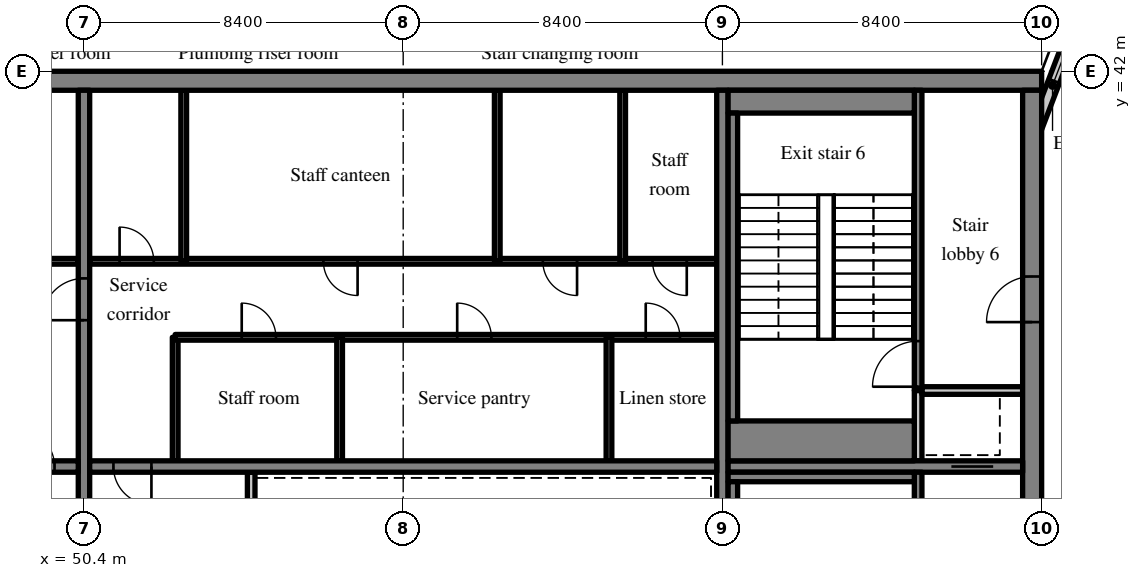
"""IFC4 building model, lengths in metres.
Left out: names, types, materials, properties, quantities, classifications, styles, units other than length and angle.
Written with IfcOpenShell. Run it as: python <this file> out.ifc"""

import sys

from ifc_helpers import new_model, si_unit, direction, frame, frame_2d, origin, place, context, subcontext, project, spatial, rectangle, extrude, source, transform, mapped, element, fill, save


model = new_model("IFC4")
c1 = context("Model", 3, precision=1e-05, world=origin(), true_north=direction((0.0, 1.0)))
c2 = subcontext(c1, "Body", "Model", "MODEL_VIEW")
j1 = project(units=[si_unit("LENGTHUNIT", "METRE"), si_unit("PLANEANGLEUNIT", "RADIAN")], contexts=[c1])
p1 = place(None, origin())
s1 = spatial("IfcSite", under=j1, at=p1, CompositionType="ELEMENT")
p2 = place(p1, origin())
s2 = spatial("IfcBuilding", under=s1, at=p2, CompositionType="ELEMENT")
p3 = place(p2, frame((0.0, 0.0, 297.7)))
s3 = spatial("IfcBuildingStorey", under=s2, at=p3, CompositionType="ELEMENT", Elevation=297.7)
m1 = source(origin(), c2, "Body", "SweptSolid", [
    extrude(rectangle(XDim=50.4, YDim=0.5, at=frame_2d((25.2, 0.0))), origin(), (0.0, 0.0, 1.0), 3.72),
])
p4 = place(p3, frame((25.2, 41.75, 0.0), z_axis=(0.0, 0.0, 1.0), x_axis=(1.0, 0.0, 0.0)))
e1 = element("IfcWall", 1, at=p4, inside=s3, PredefinedType="SHEAR", context=c2, shape_type="MappedRepresentation", body=[
    mapped(m1, transform((0.0, 0.0, 0.0), scale=1.0)),
])
m2 = source(origin(), c2, "Body", "SweptSolid", [
    extrude(rectangle(XDim=19.0, YDim=0.5, at=frame_2d((9.5, 0.0))), origin(), (0.0, 0.0, 1.0), 3.72),
])
p5 = place(p3, frame((75.35, 22.5, 0.0), z_axis=(0.0, 0.0, 1.0), x_axis=(0.0, 1.0, 0.0)))
e2 = element("IfcWall", 2, at=p5, inside=s3, PredefinedType="SHEAR", context=c2, shape_type="MappedRepresentation", body=[
    mapped(m2, transform((0.0, 0.0, 0.0), scale=1.0)),
])
m3 = source(origin(), c2, "Body", "SweptSolid", [
    extrude(rectangle(XDim=1.2, YDim=2.1, at=frame_2d((0.6, 1.05))), frame((0.0, 0.26, 0.0), z_axis=(0.0, -1.0, 0.0), x_axis=(1.0, 0.0, 0.0)), (0.0, 0.0, 1.0), 0.52),
])
p6 = place(p5, frame((12.9, 0.0, 0.0)))
e3 = element("IfcOpeningElement", 3, at=p6, cuts=e2, PredefinedType="OPENING", context=c2, shape_type="MappedRepresentation", body=[
    mapped(m3, transform((0.0, 0.0, 0.0), scale=1.0)),
])
m4 = source(origin(), c2, "Body", "SweptSolid", [
    extrude(rectangle(XDim=19.0, YDim=0.3, at=frame_2d((9.5, 0.0))), origin(), (0.0, 0.0, 1.0), 3.72),
])
p7 = place(p3, frame((50.4, 22.5, 0.0), z_axis=(0.0, 0.0, 1.0), x_axis=(0.0, 1.0, 0.0)))
e4 = element("IfcWall", 4, at=p7, inside=s3, PredefinedType="SHEAR", context=c2, shape_type="MappedRepresentation", body=[
    mapped(m4, transform((0.0, 0.0, 0.0), scale=1.0)),
])
m5 = source(origin(), c2, "Body", "SweptSolid", [
    extrude(rectangle(XDim=1.1, YDim=2.1, at=frame_2d((0.55, 1.05))), frame((0.0, 0.16, 0.0), z_axis=(0.0, -1.0, 0.0), x_axis=(1.0, 0.0, 0.0)), (0.0, 0.0, 1.0), 0.32),
])
p8 = place(p7, frame((12.95, 0.0, 0.0)))
e5 = element("IfcOpeningElement", 5, at=p8, cuts=e4, PredefinedType="OPENING", context=c2, shape_type="MappedRepresentation", body=[
    mapped(m5, transform((0.0, 0.0, 0.0), scale=1.0)),
])
p9 = place(p3, frame((67.2, 22.5, 0.0), z_axis=(0.0, 0.0, 1.0), x_axis=(0.0, 1.0, 0.0)))
e6 = element("IfcWall", 6, at=p9, inside=s3, PredefinedType="SHEAR", context=c2, shape_type="MappedRepresentation", body=[
    mapped(m4, transform((0.0, 0.0, 0.0), scale=1.0)),
])
m6 = source(origin(), c2, "Body", "SweptSolid", [
    extrude(rectangle(XDim=16.5, YDim=0.3, at=frame_2d((8.25, 0.0))), origin(), (0.0, 0.0, 1.0), 3.72),
])
p10 = place(p3, frame((33.75, 31.6, 0.0), z_axis=(0.0, 0.0, 1.0), x_axis=(1.0, 0.0, 0.0)))
e7 = element("IfcWall", 7, at=p10, inside=s3, PredefinedType="SHEAR", context=c2, shape_type="MappedRepresentation", body=[
    mapped(m6, transform((0.0, 0.0, 0.0), scale=1.0)),
])
m7 = source(origin(), c2, "Body", "SweptSolid", [
    extrude(rectangle(XDim=1.0, YDim=2.1, at=frame_2d((0.5, 1.05))), frame((0.0, 0.16, 0.0), z_axis=(0.0, -1.0, 0.0), x_axis=(1.0, 0.0, 0.0)), (0.0, 0.0, 1.0), 0.32),
])
p11 = place(p10, frame((14.875, 0.0, 0.0)))
e8 = element("IfcOpeningElement", 8, at=p11, cuts=e7, PredefinedType="OPENING", context=c2, shape_type="MappedRepresentation", body=[
    mapped(m7, transform((0.0, 0.0, 0.0), scale=1.0)),
])
p12 = place(p3, frame((50.55, 31.6, 0.0), z_axis=(0.0, 0.0, 1.0), x_axis=(1.0, 0.0, 0.0)))
e9 = element("IfcWall", 9, at=p12, inside=s3, PredefinedType="SHEAR", context=c2, shape_type="MappedRepresentation", body=[
    mapped(m6, transform((0.0, 0.0, 0.0), scale=1.0)),
])
p13 = place(p12, frame((0.625, 0.0, 0.0)))
e10 = element("IfcOpeningElement", 10, at=p13, cuts=e9, PredefinedType="OPENING", context=c2, shape_type="MappedRepresentation", body=[
    mapped(m7, transform((0.0, 0.0, 0.0), scale=1.0)),
])
m8 = source(origin(), c2, "Body", "SweptSolid", [
    extrude(rectangle(XDim=7.75, YDim=0.3, at=frame_2d((3.875, 0.0))), origin(), (0.0, 0.0, 1.0), 3.72),
])
p14 = place(p3, frame((67.35, 31.6, 0.0), z_axis=(0.0, 0.0, 1.0), x_axis=(1.0, 0.0, 0.0)))
e11 = element("IfcWall", 11, at=p14, inside=s3, PredefinedType="SHEAR", context=c2, shape_type="MappedRepresentation", body=[
    mapped(m8, transform((0.0, 0.0, 0.0), scale=1.0)),
])
p15 = place(p14, frame((5.875, 0.0, 0.0)))
e12 = element("IfcOpeningElement", 12, at=p15, cuts=e11, PredefinedType="OPENING", context=c2, shape_type="MappedRepresentation", body=[
    mapped(m5, transform((0.0, 0.0, 0.0), scale=1.0)),
])
m9 = source(origin(), c2, "Body", "SweptSolid", [
    extrude(rectangle(XDim=3.559, YDim=0.3, at=frame_2d((1.78, 0.0))), origin(), (0.0, 0.0, 1.0), 3.72),
])
p16 = place(p3, frame((76.523, 43.292, 0.0), z_axis=(0.0, 0.0, 1.0), x_axis=(-0.35779745313, -0.933799219604, 0.0)))
e13 = element("IfcWall", 13, at=p16, inside=s3, PredefinedType="SOLIDWALL", context=c2, shape_type="MappedRepresentation", body=[
    mapped(m9, transform((0.0, 0.0, 0.0), scale=1.0)),
])
m10 = source(origin(), c2, "Body", "SweptSolid", [
    extrude(rectangle(XDim=1.5, YDim=2.0, at=frame_2d((0.75, 1.0))), frame((0.0, 0.16, 0.0), z_axis=(0.0, -1.0, 0.0), x_axis=(1.0, 0.0, 0.0)), (0.0, 0.0, 1.0), 0.32),
])
p17 = place(p16, frame((0.156, 0.0, 0.9)))
e14 = element("IfcOpeningElement", 14, at=p17, cuts=e13, PredefinedType="OPENING", context=c2, shape_type="MappedRepresentation", body=[
    mapped(m10, transform((0.0, 0.0, 0.0), scale=1.0)),
])
m11 = source(origin(), c2, "Body", "SweptSolid", [
    extrude(rectangle(XDim=16.5, YDim=0.15, at=frame_2d((8.25, 0.0))), origin(), (0.0, 0.0, 1.0), 3.72),
])
p18 = place(p3, frame((33.75, 37.0, 0.0), z_axis=(0.0, 0.0, 1.0), x_axis=(1.0, 0.0, 0.0)))
e15 = element("IfcWall", 15, at=p18, inside=s3, PredefinedType="PARTITIONING", context=c2, shape_type="MappedRepresentation", body=[
    mapped(m11, transform((0.0, 0.0, 0.0), scale=1.0)),
])
m12 = source(origin(), c2, "Body", "SweptSolid", [
    extrude(rectangle(XDim=0.9, YDim=2.1, at=frame_2d((0.45, 1.05))), frame((0.0, 0.085, 0.0), z_axis=(0.0, -1.0, 0.0), x_axis=(1.0, 0.0, 0.0)), (0.0, 0.0, 1.0), 0.17),
])
p19 = place(p18, frame((3.262, 0.0, 0.0)))
e16 = element("IfcOpeningElement", 16, at=p19, cuts=e15, PredefinedType="OPENING", context=c2, shape_type="MappedRepresentation", body=[
    mapped(m12, transform((0.0, 0.0, 0.0), scale=1.0)),
])
p20 = place(p18, frame((8.212, 0.0, 0.0)))
e17 = element("IfcOpeningElement", 17, at=p20, cuts=e15, PredefinedType="OPENING", context=c2, shape_type="MappedRepresentation", body=[
    mapped(m12, transform((0.0, 0.0, 0.0), scale=1.0)),
])
p21 = place(p18, frame((11.512, 0.0, 0.0)))
e18 = element("IfcOpeningElement", 18, at=p21, cuts=e15, PredefinedType="OPENING", context=c2, shape_type="MappedRepresentation", body=[
    mapped(m12, transform((0.0, 0.0, 0.0), scale=1.0)),
])
p22 = place(p18, frame((14.813, 0.0, 0.0)))
e19 = element("IfcOpeningElement", 19, at=p22, cuts=e15, PredefinedType="OPENING", context=c2, shape_type="MappedRepresentation", body=[
    mapped(m12, transform((0.0, 0.0, 0.0), scale=1.0)),
])
m13 = source(origin(), c2, "Body", "SweptSolid", [
    extrude(rectangle(XDim=2.65, YDim=0.2, at=frame_2d((1.325, 0.0))), origin(), (0.0, 0.0, 1.0), 3.72),
])
p23 = place(p3, frame((54.8, 28.8, 0.0), z_axis=(0.0, 0.0, 1.0), x_axis=(0.0, 1.0, 0.0)))
e20 = element("IfcWall", 20, at=p23, inside=s3, PredefinedType="SOLIDWALL", context=c2, shape_type="MappedRepresentation", body=[
    mapped(m13, transform((0.0, 0.0, 0.0), scale=1.0)),
])
m14 = source(origin(), c2, "Body", "SweptSolid", [
    extrude(rectangle(XDim=3.25, YDim=0.15, at=frame_2d((1.625, 0.0))), origin(), (0.0, 0.0, 1.0), 3.72),
])
p24 = place(p3, frame((52.8, 31.75, 0.0), z_axis=(0.0, 0.0, 1.0), x_axis=(0.0, 1.0, 0.0)))
e21 = element("IfcWall", 21, at=p24, inside=s3, PredefinedType="PARTITIONING", context=c2, shape_type="MappedRepresentation", body=[
    mapped(m14, transform((0.0, 0.0, 0.0), scale=1.0)),
])
m15 = source(origin(), c2, "Body", "SweptSolid", [
    extrude(rectangle(XDim=14.25, YDim=0.15, at=frame_2d((7.125, 0.0))), origin(), (0.0, 0.0, 1.0), 3.72),
])
p25 = place(p3, frame((67.05, 35.0, 0.0), z_axis=(0.0, 0.0, 1.0), x_axis=(-1.0, 0.0, 0.0)))
e22 = element("IfcWall", 22, at=p25, inside=s3, PredefinedType="PARTITIONING", context=c2, shape_type="MappedRepresentation", body=[
    mapped(m15, transform((0.0, 0.0, 0.0), scale=1.0)),
])
p26 = place(p25, frame((0.968, 0.0, 0.0)))
e23 = element("IfcOpeningElement", 23, at=p26, cuts=e22, PredefinedType="OPENING", context=c2, shape_type="MappedRepresentation", body=[
    mapped(m12, transform((0.0, 0.0, 0.0), scale=1.0)),
])
p27 = place(p25, frame((5.929, 0.0, 0.0)))
e24 = element("IfcOpeningElement", 24, at=p27, cuts=e22, PredefinedType="OPENING", context=c2, shape_type="MappedRepresentation", body=[
    mapped(m12, transform((0.0, 0.0, 0.0), scale=1.0)),
])
p28 = place(p25, frame((11.599, 0.0, 0.0)))
e25 = element("IfcOpeningElement", 25, at=p28, cuts=e22, PredefinedType="OPENING", context=c2, shape_type="MappedRepresentation", body=[
    mapped(m12, transform((0.0, 0.0, 0.0), scale=1.0)),
])
p29 = place(p3, frame((67.05, 37.0, 0.0), z_axis=(0.0, 0.0, 1.0), x_axis=(-1.0, 0.0, 0.0)))
e26 = element("IfcWall", 26, at=p29, inside=s3, PredefinedType="PARTITIONING", context=c2, shape_type="MappedRepresentation", body=[
    mapped(m11, transform((0.0, 0.0, 0.0), scale=1.0)),
])
p30 = place(p29, frame((0.788, 0.0, 0.0)))
e27 = element("IfcOpeningElement", 27, at=p30, cuts=e26, PredefinedType="OPENING", context=c2, shape_type="MappedRepresentation", body=[
    mapped(m12, transform((0.0, 0.0, 0.0), scale=1.0)),
])
p31 = place(p29, frame((3.675, 0.0, 0.0)))
e28 = element("IfcOpeningElement", 28, at=p31, cuts=e26, PredefinedType="OPENING", context=c2, shape_type="MappedRepresentation", body=[
    mapped(m12, transform((0.0, 0.0, 0.0), scale=1.0)),
])
p32 = place(p29, frame((9.45, 0.0, 0.0)))
e29 = element("IfcOpeningElement", 29, at=p32, cuts=e26, PredefinedType="OPENING", context=c2, shape_type="MappedRepresentation", body=[
    mapped(m12, transform((0.0, 0.0, 0.0), scale=1.0)),
])
p33 = place(p29, frame((14.813, 0.0, 0.0)))
e30 = element("IfcOpeningElement", 30, at=p33, cuts=e26, PredefinedType="OPENING", context=c2, shape_type="MappedRepresentation", body=[
    mapped(m12, transform((0.0, 0.0, 0.0), scale=1.0)),
])
for number, where, z_axis, x_axis in (
    (31, (64.215, 31.75, 0.0), (0.0, 0.0, 1.0), (0.0, 1.0, 0.0)),
    (32, (57.127, 31.75, 0.0), (0.0, 0.0, 1.0), (0.0, 1.0, 0.0)),
):
    element("IfcWall", number, at=place(p3, frame(where, z_axis=z_axis, x_axis=x_axis)), inside=s3, PredefinedType="PARTITIONING", context=c2, shape_type="MappedRepresentation", body=[
        mapped(m14, transform((0.0, 0.0, 0.0), scale=1.0)),
    ])
m16 = source(origin(), c2, "Body", "SweptSolid", [
    extrude(rectangle(XDim=4.5, YDim=0.15, at=frame_2d((2.25, 0.0))), origin(), (0.0, 0.0, 1.0), 3.72),
])
for number, where, z_axis, x_axis in (
    (33, (64.575, 37.0, 0.0), (0.0, 0.0, 1.0), (0.0, 1.0, 0.0)),
    (34, (61.275, 37.0, 0.0), (0.0, 0.0, 1.0), (0.0, 1.0, 0.0)),
    (35, (53.025, 37.0, 0.0), (0.0, 0.0, 1.0), (0.0, 1.0, 0.0)),
):
    element("IfcWall", number, at=place(p3, frame(where, z_axis=z_axis, x_axis=x_axis)), inside=s3, PredefinedType="PARTITIONING", context=c2, shape_type="MappedRepresentation", body=[
        mapped(m16, transform((0.0, 0.0, 0.0), scale=1.0)),
    ])
m17 = source(origin(), c2, "Body", "SweptSolid", [
    extrude(rectangle(XDim=8.95, YDim=0.2, at=frame_2d((4.475, 0.0))), origin(), (0.0, 0.0, 1.0), 3.72),
])
p34 = place(p3, frame((72.35, 22.5, 0.0), z_axis=(0.0, 0.0, 1.0), x_axis=(0.0, 1.0, 0.0)))
e36 = element("IfcWall", 36, at=p34, inside=s3, PredefinedType="SOLIDWALL", context=c2, shape_type="MappedRepresentation", body=[
    mapped(m17, transform((0.0, 0.0, 0.0), scale=1.0)),
])
m18 = source(origin(), c2, "Body", "SweptSolid", [
    extrude(rectangle(XDim=1.2, YDim=2.1, at=frame_2d((0.6, 1.05))), frame((0.0, 0.11, 0.0), z_axis=(0.0, -1.0, 0.0), x_axis=(1.0, 0.0, 0.0)), (0.0, 0.0, 1.0), 0.22),
])
p35 = place(p34, frame((1.1, 0.0, 0.0)))
e37 = element("IfcOpeningElement", 37, at=p35, cuts=e36, PredefinedType="OPENING", context=c2, shape_type="MappedRepresentation", body=[
    mapped(m18, transform((0.0, 0.0, 0.0), scale=1.0)),
])
m19 = source(origin(), c2, "Body", "SweptSolid", [
    extrude(rectangle(XDim=1.85, YDim=0.2, at=frame_2d((0.925, 0.0))), origin(), (0.0, 0.0, 1.0), 3.72),
])
p36 = place(p3, frame((72.35, 31.75, 0.0), z_axis=(0.0, 0.0, 1.0), x_axis=(0.0, 1.0, 0.0)))
e38 = element("IfcWall", 38, at=p36, inside=s3, PredefinedType="SOLIDWALL", context=c2, shape_type="MappedRepresentation", body=[
    mapped(m19, transform((0.0, 0.0, 0.0), scale=1.0)),
])
m20 = source(origin(), c2, "Body", "SweptSolid", [
    extrude(rectangle(XDim=2.65, YDim=0.2, at=frame_2d((1.325, 0.0))), origin(), (0.0, 0.0, 1.0), 3.72),
])
p37 = place(p3, frame((72.45, 33.6, 0.0), z_axis=(0.0, 0.0, 1.0), x_axis=(1.0, 0.0, 0.0)))
e39 = element("IfcWall", 39, at=p37, inside=s3, PredefinedType="SOLIDWALL", context=c2, shape_type="MappedRepresentation", body=[
    mapped(m20, transform((0.0, 0.0, 0.0), scale=1.0)),
])
m21 = source(origin(), c2, "Body", "SweptSolid", [
    extrude(rectangle(XDim=7.9, YDim=0.2, at=frame_2d((3.95, 0.0))), origin(), (0.0, 0.0, 1.0), 3.72),
])
p38 = place(p3, frame((72.35, 33.6, 0.0), z_axis=(0.0, 0.0, 1.0), x_axis=(0.0, 1.0, 0.0)))
e40 = element("IfcWall", 40, at=p38, inside=s3, PredefinedType="SOLIDWALL", context=c2, shape_type="MappedRepresentation", body=[
    mapped(m21, transform((0.0, 0.0, 0.0), scale=1.0)),
])
p39 = place(p38, frame((0.1, 0.0, 0.0)))
e41 = element("IfcOpeningElement", 41, at=p39, cuts=e40, PredefinedType="OPENING", context=c2, shape_type="MappedRepresentation", body=[
    mapped(m18, transform((0.0, 0.0, 0.0), scale=1.0)),
])
m22 = source(origin(), c2, "Body", "SweptSolid", [
    extrude(rectangle(XDim=4.9, YDim=0.25, at=frame_2d((2.45, 0.0))), origin(), (0.0, 0.0, 1.0), 3.72),
])
p40 = place(p3, frame((67.35, 31.325, 0.0), z_axis=(0.0, 0.0, 1.0), x_axis=(1.0, 0.0, 0.0)))
e42 = element("IfcWall", 42, at=p40, inside=s3, PredefinedType="SOLIDWALL", context=c2, shape_type="MappedRepresentation", body=[
    mapped(m22, transform((0.0, 0.0, 0.0), scale=1.0)),
])
m23 = source(origin(), c2, "Body", "SweptSolid", [
    extrude(rectangle(XDim=8.1, YDim=0.25, at=frame_2d((4.05, 0.0))), origin(), (0.0, 0.0, 1.0), 3.72),
])
p41 = place(p3, frame((67.475, 23.1, 0.0), z_axis=(0.0, 0.0, 1.0), x_axis=(0.0, 1.0, 0.0)))
e43 = element("IfcWall", 43, at=p41, inside=s3, PredefinedType="SOLIDWALL", context=c2, shape_type="MappedRepresentation", body=[
    mapped(m23, transform((0.0, 0.0, 0.0), scale=1.0)),
])
m24 = source(origin(), c2, "Body", "SweptSolid", [
    extrude(rectangle(XDim=4.9, YDim=0.6, at=frame_2d((2.45, 0.0))), origin(), (0.0, 0.0, 1.0), 3.72),
])
p42 = place(p3, frame((67.35, 41.2, 0.0), z_axis=(0.0, 0.0, 1.0), x_axis=(1.0, 0.0, 0.0)))
e44 = element("IfcWall", 44, at=p42, inside=s3, PredefinedType="SOLIDWALL", context=c2, shape_type="MappedRepresentation", body=[
    mapped(m24, transform((0.0, 0.0, 0.0), scale=1.0)),
])
m25 = source(origin(), c2, "Body", "SweptSolid", [
    extrude(rectangle(XDim=4.9, YDim=1.05, at=frame_2d((2.45, 0.0))), origin(), (0.0, 0.0, 1.0), 3.72),
])
p43 = place(p3, frame((67.35, 32.275, 0.0), z_axis=(0.0, 0.0, 1.0), x_axis=(1.0, 0.0, 0.0)))
e45 = element("IfcWall", 45, at=p43, inside=s3, PredefinedType="SOLIDWALL", context=c2, shape_type="MappedRepresentation", body=[
    mapped(m25, transform((0.0, 0.0, 0.0), scale=1.0)),
])
p44 = place(p3, frame((67.475, 32.8, 0.0), z_axis=(0.0, 0.0, 1.0), x_axis=(0.0, 1.0, 0.0)))
e46 = element("IfcWall", 46, at=p44, inside=s3, PredefinedType="SOLIDWALL", context=c2, shape_type="MappedRepresentation", body=[
    mapped(m23, transform((0.0, 0.0, 0.0), scale=1.0)),
])
m26 = source(origin(), c2, "Body", "SweptSolid", [
    extrude(rectangle(XDim=1.5, YDim=2.0, at=frame_2d((0.75, 1.0))), frame((0.0, 0.03, 0.0), z_axis=(0.0, -1.0, 0.0), x_axis=(1.0, 0.0, 0.0)), (0.0, 0.0, 1.0), 0.06),
])
p45 = place(p17, origin())
e47 = element("IfcWindow", 47, at=p45, inside=s3, PartitioningType="SINGLE_PANEL", PredefinedType="WINDOW", context=c2, shape_type="MappedRepresentation", body=[
    mapped(m26, transform((0.0, 0.0, 0.0), scale=1.0)),
])
fill(e14, e47)
m27 = source(origin(), c2, "Body", "SweptSolid", [
    extrude(rectangle(XDim=1.0, YDim=2.1, at=frame_2d((0.5, 1.05))), frame((0.0, 0.025, 0.0), z_axis=(0.0, -1.0, 0.0), x_axis=(1.0, 0.0, 0.0)), (0.0, 0.0, 1.0), 0.05),
])
p46 = place(p11, origin())
e48 = element("IfcDoor", 48, at=p46, inside=s3, OperationType="SINGLE_SWING_LEFT", PredefinedType="DOOR", context=c2, shape_type="MappedRepresentation", body=[
    mapped(m27, transform((0.0, 0.0, 0.0), scale=1.0)),
])
fill(e8, e48)
p47 = place(p13, origin())
e49 = element("IfcDoor", 49, at=p47, inside=s3, OperationType="SINGLE_SWING_RIGHT", PredefinedType="DOOR", context=c2, shape_type="MappedRepresentation", body=[
    mapped(m27, transform((0.0, 0.0, 0.0), scale=1.0)),
])
fill(e10, e49)
m28 = source(origin(), c2, "Body", "SweptSolid", [
    extrude(rectangle(XDim=0.9, YDim=2.1, at=frame_2d((0.45, 1.05))), frame((0.0, 0.025, 0.0), z_axis=(0.0, -1.0, 0.0), x_axis=(1.0, 0.0, 0.0)), (0.0, 0.0, 1.0), 0.05),
])
p48 = place(p26, origin())
e50 = element("IfcDoor", 50, at=p48, inside=s3, OperationType="SINGLE_SWING_RIGHT", PredefinedType="DOOR", context=c2, shape_type="MappedRepresentation", body=[
    mapped(m28, transform((0.0, 0.0, 0.0), scale=1.0)),
])
fill(e23, e50)
p49 = place(p27, origin())
e51 = element("IfcDoor", 51, at=p49, inside=s3, OperationType="SINGLE_SWING_RIGHT", PredefinedType="DOOR", context=c2, shape_type="MappedRepresentation", body=[
    mapped(m28, transform((0.0, 0.0, 0.0), scale=1.0)),
])
fill(e24, e51)
p50 = place(p28, origin())
e52 = element("IfcDoor", 52, at=p50, inside=s3, OperationType="SINGLE_SWING_RIGHT", PredefinedType="DOOR", context=c2, shape_type="MappedRepresentation", body=[
    mapped(m28, transform((0.0, 0.0, 0.0), scale=1.0)),
])
fill(e25, e52)
p51 = place(p30, origin())
e53 = element("IfcDoor", 53, at=p51, inside=s3, OperationType="SINGLE_SWING_LEFT", PredefinedType="DOOR", context=c2, shape_type="MappedRepresentation", body=[
    mapped(m28, transform((0.0, 0.0, 0.0), scale=1.0)),
])
fill(e27, e53)
p52 = place(p31, origin())
e54 = element("IfcDoor", 54, at=p52, inside=s3, OperationType="SINGLE_SWING_LEFT", PredefinedType="DOOR", context=c2, shape_type="MappedRepresentation", body=[
    mapped(m28, transform((0.0, 0.0, 0.0), scale=1.0)),
])
fill(e28, e54)
p53 = place(p32, origin())
e55 = element("IfcDoor", 55, at=p53, inside=s3, OperationType="SINGLE_SWING_LEFT", PredefinedType="DOOR", context=c2, shape_type="MappedRepresentation", body=[
    mapped(m28, transform((0.0, 0.0, 0.0), scale=1.0)),
])
fill(e29, e55)
p54 = place(p33, origin())
e56 = element("IfcDoor", 56, at=p54, inside=s3, OperationType="SINGLE_SWING_RIGHT", PredefinedType="DOOR", context=c2, shape_type="MappedRepresentation", body=[
    mapped(m28, transform((0.0, 0.0, 0.0), scale=1.0)),
])
fill(e30, e56)
m29 = source(origin(), c2, "Body", "SweptSolid", [
    extrude(rectangle(XDim=1.1, YDim=2.1, at=frame_2d((0.55, 1.05))), frame((0.0, 0.025, 0.0), z_axis=(0.0, -1.0, 0.0), x_axis=(1.0, 0.0, 0.0)), (0.0, 0.0, 1.0), 0.05),
])
p55 = place(p15, origin())
e57 = element("IfcDoor", 57, at=p55, inside=s3, OperationType="SLIDING_TO_LEFT", PredefinedType="DOOR", context=c2, shape_type="MappedRepresentation", body=[
    mapped(m29, transform((0.0, 0.0, 0.0), scale=1.0)),
])
fill(e12, e57)
m30 = source(origin(), c2, "Body", "SweptSolid", [
    extrude(rectangle(XDim=1.2, YDim=2.1, at=frame_2d((0.6, 1.05))), frame((0.0, 0.025, 0.0), z_axis=(0.0, -1.0, 0.0), x_axis=(1.0, 0.0, 0.0)), (0.0, 0.0, 1.0), 0.05),
])
p56 = place(p39, origin())
e58 = element("IfcDoor", 58, at=p56, inside=s3, OperationType="SINGLE_SWING_LEFT", PredefinedType="DOOR", context=c2, shape_type="MappedRepresentation", body=[
    mapped(m30, transform((0.0, 0.0, 0.0), scale=1.0)),
])
fill(e41, e58)
p57 = place(p6, origin())
e59 = element("IfcDoor", 59, at=p57, inside=s3, OperationType="SINGLE_SWING_LEFT", PredefinedType="DOOR", context=c2, shape_type="MappedRepresentation", body=[
    mapped(m30, transform((0.0, 0.0, 0.0), scale=1.0)),
])
fill(e3, e59)
p58 = place(p8, origin())
e60 = element("IfcDoor", 60, at=p58, inside=s3, OperationType="SINGLE_SWING_LEFT", PredefinedType="DOOR", context=c2, shape_type="MappedRepresentation", body=[
    mapped(m29, transform((0.0, 0.0, 0.0), scale=1.0)),
])
fill(e5, e60)
save(model, sys.argv[1])
